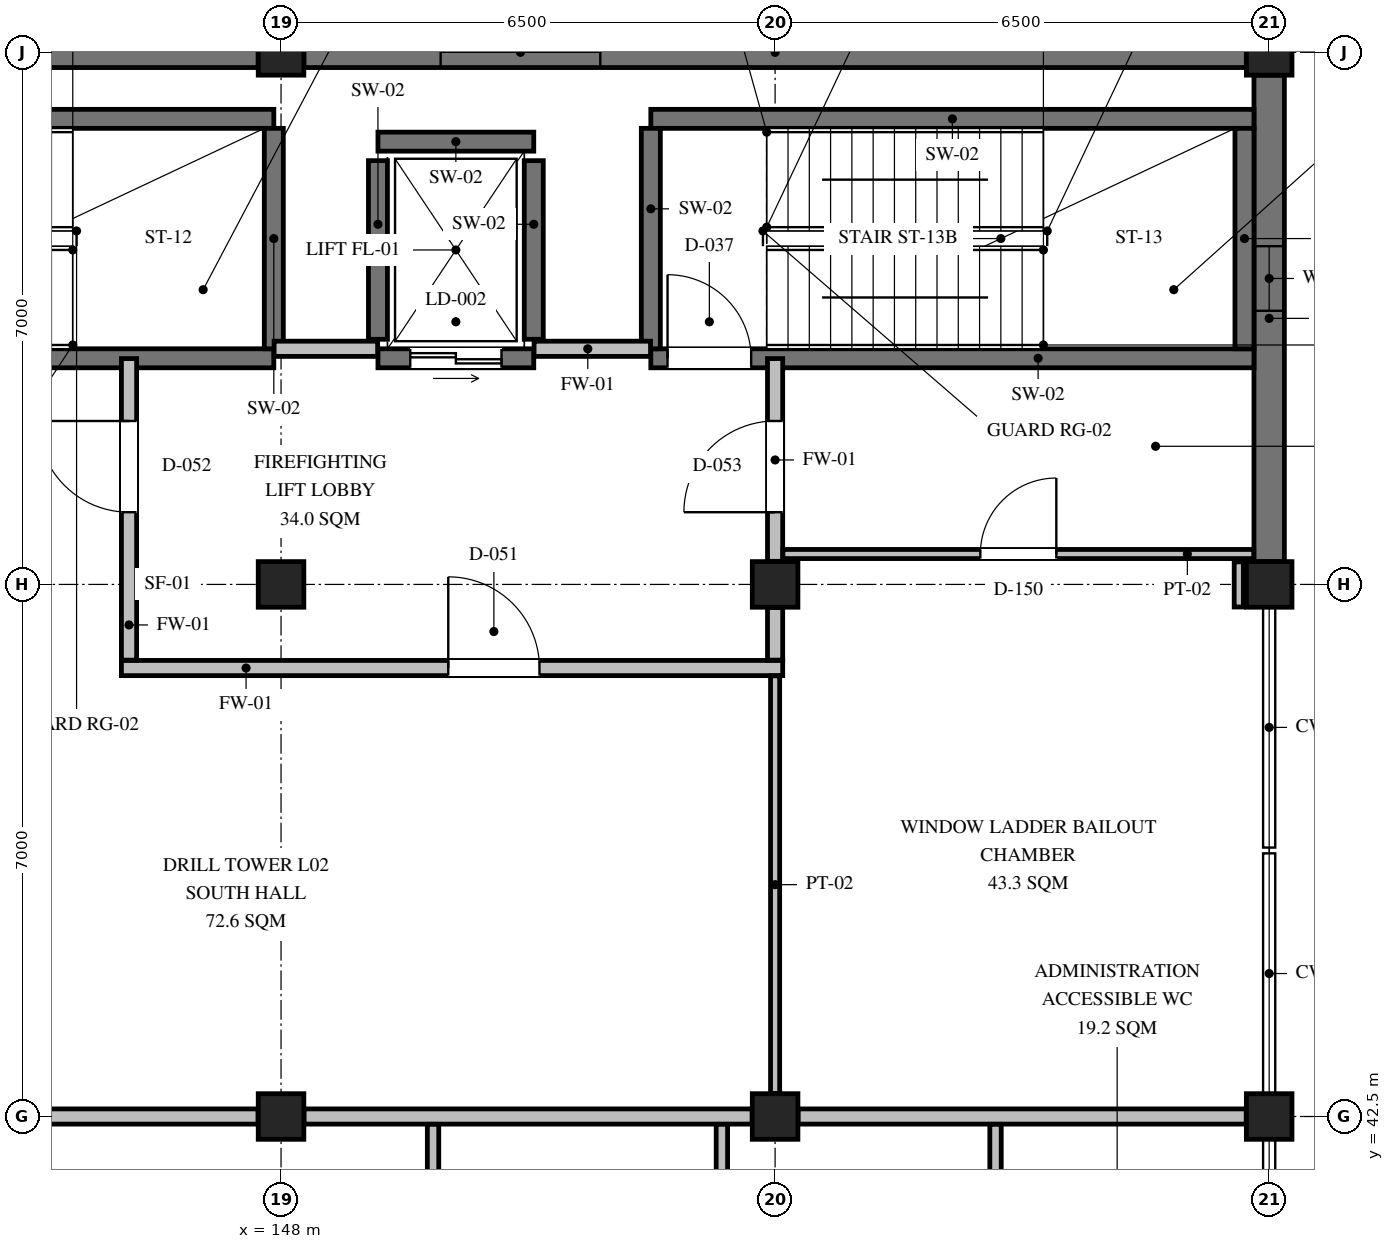
"""IFC4 building model, lengths in metres.
Left out: names, types, materials, properties, quantities, classifications, styles, units other than length and angle.
Written with IfcOpenShell. Run it as: python <this file> out.ifc"""

import sys

from ifc_helpers import new_model, si_unit, direction, frame, frame_2d, origin, origin_2d, place, context, subcontext, project, spatial, rectangle, extrude, element, fill, save


model = new_model("IFC4")
c1 = context("Model", 3, precision=1e-05, world=origin(), true_north=direction((0.0, 1.0)))
c2 = subcontext(c1, "Body", "Model", "MODEL_VIEW")
j1 = project(units=[si_unit("LENGTHUNIT", "METRE"), si_unit("PLANEANGLEUNIT", "RADIAN")], contexts=[c1])
p1 = place(None, origin())
s1 = spatial("IfcSite", under=j1, at=p1, CompositionType="ELEMENT")
p2 = place(p1, origin())
s2 = spatial("IfcBuilding", under=s1, at=p2, CompositionType="ELEMENT")
p3 = place(p2, frame((0.0, 0.0, 5.85)))
s3 = spatial("IfcBuildingStorey", under=s2, at=p3, CompositionType="ELEMENT", Elevation=5.85)
for number, where, z_axis, x_axis in (
    (1, (148.0, 42.5, 0.0), (0.0, 0.0, 1.0), (1.0, 0.0, 0.0)),
    (2, (148.0, 49.5, 0.0), (0.0, 0.0, 1.0), (1.0, 0.0, 0.0)),
    (3, (148.0, 56.5, 0.0), (0.0, 0.0, 1.0), (1.0, 0.0, 0.0)),
    (4, (154.5, 42.5, 0.0), (0.0, 0.0, 1.0), (1.0, 0.0, 0.0)),
    (5, (154.5, 49.5, 0.0), (0.0, 0.0, 1.0), (1.0, 0.0, 0.0)),
    (6, (161.0, 42.5, 0.0), (0.0, 0.0, 1.0), (1.0, 0.0, 0.0)),
    (7, (161.0, 49.5, 0.0), (0.0, 0.0, 1.0), (1.0, 0.0, 0.0)),
    (8, (161.0, 56.5, 0.0), (0.0, 0.0, 1.0), (1.0, 0.0, 0.0)),
):
    element("IfcColumn", number, at=place(p3, frame(where, z_axis=z_axis, x_axis=x_axis)), inside=s3, PredefinedType="COLUMN", context=c2, shape_type="SweptSolid", body=[
        extrude(rectangle(XDim=0.6, YDim=0.6, at=origin_2d()), origin(), (0.0, 0.0, 1.0), 4.2),
    ])
p4 = place(p3, frame((140.3, 56.5, 0.0), z_axis=(0.0, 0.0, 1.0), x_axis=(1.0, 0.0, 0.0)))
e9 = element("IfcWall", 9, at=p4, inside=s3, PredefinedType="SHEAR", context=c2, shape_type="SweptSolid", body=[
    extrude(rectangle(XDim=7.4, YDim=0.4, at=frame_2d((3.7, 0.0))), origin(), (0.0, 0.0, 1.0), 4.0),
])
p5 = place(p4, frame((1.8, 0.0, 0.9)))
e10 = element("IfcOpeningElement", 10, at=p5, cuts=e9, PredefinedType="OPENING", context=c2, shape_type="SweptSolid", body=[
    extrude(rectangle(XDim=1.8, YDim=2.1, at=frame_2d((0.9, 1.05))), frame((0.0, 0.21, 0.0), z_axis=(0.0, -1.0, 0.0), x_axis=(1.0, 0.0, 0.0)), (0.0, 0.0, 1.0), 0.42),
])
p6 = place(p3, frame((148.3, 56.5, 0.0), z_axis=(0.0, 0.0, 1.0), x_axis=(1.0, 0.0, 0.0)))
e11 = element("IfcWall", 11, at=p6, inside=s3, PredefinedType="SHEAR", context=c2, shape_type="SweptSolid", body=[
    extrude(rectangle(XDim=12.4, YDim=0.4, at=frame_2d((6.2, 0.0))), origin(), (0.0, 0.0, 1.0), 4.0),
])
p7 = place(p6, frame((1.8, 0.0, 0.9)))
e12 = element("IfcOpeningElement", 12, at=p7, cuts=e11, PredefinedType="OPENING", context=c2, shape_type="SweptSolid", body=[
    extrude(rectangle(XDim=2.1, YDim=2.1, at=frame_2d((1.05, 1.05))), frame((0.0, 0.21, 0.0), z_axis=(0.0, -1.0, 0.0), x_axis=(1.0, 0.0, 0.0)), (0.0, 0.0, 1.0), 0.42),
])
p8 = place(p3, frame((161.0, 49.8, 0.0), z_axis=(0.0, 0.0, 1.0), x_axis=(0.0, 1.0, 0.0)))
e13 = element("IfcWall", 13, at=p8, inside=s3, PredefinedType="SHEAR", context=c2, shape_type="SweptSolid", body=[
    extrude(rectangle(XDim=6.4, YDim=0.4, at=frame_2d((3.2, 0.0))), origin(), (0.0, 0.0, 1.0), 4.0),
])
p9 = place(p8, frame((3.3, 0.0, 1.1)))
e14 = element("IfcOpeningElement", 14, at=p9, cuts=e13, PredefinedType="OPENING", context=c2, shape_type="SweptSolid", body=[
    extrude(rectangle(XDim=0.85, YDim=0.85, at=frame_2d((0.425, 0.425))), frame((0.0, 0.21, 0.0), z_axis=(0.0, -1.0, 0.0), x_axis=(1.0, 0.0, 0.0)), (0.0, 0.0, 1.0), 0.42),
])
p10 = place(p3, frame((140.095, 52.475, 0.0), z_axis=(0.0, 0.0, 1.0), x_axis=(1.0, 0.0, 0.0)))
e15 = element("IfcWall", 15, at=p10, inside=s3, PredefinedType="SHEAR", context=c2, shape_type="SweptSolid", body=[
    extrude(rectangle(XDim=7.81, YDim=0.25, at=frame_2d((3.905, 0.0))), origin(), (0.0, 0.0, 1.0), 4.0),
])
p11 = place(p10, frame((0.22, 0.0, 0.0)))
e16 = element("IfcOpeningElement", 16, at=p11, cuts=e15, PredefinedType="OPENING", context=c2, shape_type="SweptSolid", body=[
    extrude(rectangle(XDim=1.1, YDim=2.15, at=frame_2d((0.55, 1.075))), frame((0.0, 0.135, 0.0), z_axis=(0.0, -1.0, 0.0), x_axis=(1.0, 0.0, 0.0)), (0.0, 0.0, 1.0), 0.27),
])
p12 = place(p3, frame((140.095, 55.625, 0.0), z_axis=(0.0, 0.0, 1.0), x_axis=(1.0, 0.0, 0.0)))
e17 = element("IfcWall", 17, at=p12, inside=s3, PredefinedType="SHEAR", context=c2, shape_type="SweptSolid", body=[
    extrude(rectangle(XDim=7.81, YDim=0.25, at=frame_2d((3.905, 0.0))), origin(), (0.0, 0.0, 1.0), 4.0),
])
p13 = place(p3, frame((147.905, 52.6, 0.0), z_axis=(0.0, 0.0, 1.0), x_axis=(0.0, 1.0, 0.0)))
e18 = element("IfcWall", 18, at=p13, inside=s3, PredefinedType="SHEAR", context=c2, shape_type="SweptSolid", body=[
    extrude(rectangle(XDim=2.9, YDim=0.25, at=frame_2d((1.45, 0.0))), origin(), (0.0, 0.0, 1.0), 4.0),
])
p14 = place(p3, frame((152.865, 52.475, 0.0), z_axis=(0.0, 0.0, 1.0), x_axis=(1.0, 0.0, 0.0)))
e19 = element("IfcWall", 19, at=p14, inside=s3, PredefinedType="SHEAR", context=c2, shape_type="SweptSolid", body=[
    extrude(rectangle(XDim=7.935, YDim=0.25, at=frame_2d((3.968, 0.0))), origin(), (0.0, 0.0, 1.0), 4.0),
])
p15 = place(p14, frame((0.22, 0.0, 0.0)))
e20 = element("IfcOpeningElement", 20, at=p15, cuts=e19, PredefinedType="OPENING", context=c2, shape_type="SweptSolid", body=[
    extrude(rectangle(XDim=1.1, YDim=2.15, at=frame_2d((0.55, 1.075))), frame((0.0, 0.135, 0.0), z_axis=(0.0, -1.0, 0.0), x_axis=(1.0, 0.0, 0.0)), (0.0, 0.0, 1.0), 0.27),
])
p16 = place(p3, frame((152.865, 55.625, 0.0), z_axis=(0.0, 0.0, 1.0), x_axis=(1.0, 0.0, 0.0)))
e21 = element("IfcWall", 21, at=p16, inside=s3, PredefinedType="SHEAR", context=c2, shape_type="SweptSolid", body=[
    extrude(rectangle(XDim=7.935, YDim=0.25, at=frame_2d((3.968, 0.0))), origin(), (0.0, 0.0, 1.0), 4.0),
])
for number, where, z_axis, x_axis in (
    (22, (152.865, 52.6, 0.0), (0.0, 0.0, 1.0), (0.0, 1.0, 0.0)),
    (23, (160.675, 52.6, 0.0), (0.0, 0.0, 1.0), (0.0, 1.0, 0.0)),
):
    element("IfcWall", number, at=place(p3, frame(where, z_axis=z_axis, x_axis=x_axis)), inside=s3, PredefinedType="SHEAR", context=c2, shape_type="SweptSolid", body=[
        extrude(rectangle(XDim=2.9, YDim=0.25, at=frame_2d((1.45, 0.0))), origin(), (0.0, 0.0, 1.0), 4.0),
    ])
p17 = place(p3, frame((149.275, 52.475, 0.0), z_axis=(0.0, 0.0, 1.0), x_axis=(1.0, 0.0, 0.0)))
e24 = element("IfcWall", 24, at=p17, inside=s3, PredefinedType="SHEAR", context=c2, shape_type="SweptSolid", body=[
    extrude(rectangle(XDim=2.05, YDim=0.25, at=frame_2d((1.025, 0.0))), origin(), (0.0, 0.0, 1.0), 4.0),
])
p18 = place(p17, frame((0.425, 0.0, 0.0)))
e25 = element("IfcOpeningElement", 25, at=p18, cuts=e24, PredefinedType="OPENING", context=c2, shape_type="SweptSolid", body=[
    extrude(rectangle(XDim=1.2, YDim=2.15, at=frame_2d((0.6, 1.075))), frame((0.0, 0.135, 0.0), z_axis=(0.0, -1.0, 0.0), x_axis=(1.0, 0.0, 0.0)), (0.0, 0.0, 1.0), 0.27),
])
p19 = place(p3, frame((149.275, 55.325, 0.0), z_axis=(0.0, 0.0, 1.0), x_axis=(1.0, 0.0, 0.0)))
e26 = element("IfcWall", 26, at=p19, inside=s3, PredefinedType="SHEAR", context=c2, shape_type="SweptSolid", body=[
    extrude(rectangle(XDim=2.05, YDim=0.25, at=frame_2d((1.025, 0.0))), origin(), (0.0, 0.0, 1.0), 4.0),
])
for number, where, z_axis, x_axis in (
    (27, (149.275, 52.725, 0.0), (0.0, 0.0, 1.0), (0.0, 1.0, 0.0)),
    (28, (151.325, 52.725, 0.0), (0.0, 0.0, 1.0), (0.0, 1.0, 0.0)),
):
    element("IfcWall", number, at=place(p3, frame(where, z_axis=z_axis, x_axis=x_axis)), inside=s3, PredefinedType="SHEAR", context=c2, shape_type="SweptSolid", body=[
        extrude(rectangle(XDim=2.35, YDim=0.25, at=frame_2d((1.175, 0.0))), origin(), (0.0, 0.0, 1.0), 4.0),
    ])
p20 = place(p3, frame((140.302, 42.5, 0.0), z_axis=(0.0, 0.0, 1.0), x_axis=(1.0, 0.0, 0.0)))
e29 = element("IfcWall", 29, at=p20, inside=s3, PredefinedType="PARTITIONING", context=c2, shape_type="SweptSolid", body=[
    extrude(rectangle(XDim=7.396, YDim=0.2, at=frame_2d((3.698, 0.0))), origin(), (0.0, 0.0, 1.0), 3.154),
])
p21 = place(p20, frame((3.298, 0.0, 0.0)))
e30 = element("IfcOpeningElement", 30, at=p21, cuts=e29, PredefinedType="OPENING", context=c2, shape_type="SweptSolid", body=[
    extrude(rectangle(XDim=1.2, YDim=2.15, at=frame_2d((0.6, 1.075))), frame((0.0, 0.11, 0.0), z_axis=(0.0, -1.0, 0.0), x_axis=(1.0, 0.0, 0.0)), (0.0, 0.0, 1.0), 0.22),
])
p22 = place(p3, frame((148.302, 42.5, 0.0), z_axis=(0.0, 0.0, 1.0), x_axis=(1.0, 0.0, 0.0)))
e31 = element("IfcWall", 31, at=p22, inside=s3, PredefinedType="PARTITIONING", context=c2, shape_type="SweptSolid", body=[
    extrude(rectangle(XDim=5.896, YDim=0.2, at=frame_2d((2.948, 0.0))), origin(), (0.0, 0.0, 1.0), 3.054),
])
p23 = place(p3, frame((154.802, 42.5, 0.0), z_axis=(0.0, 0.0, 1.0), x_axis=(1.0, 0.0, 0.0)))
e32 = element("IfcWall", 32, at=p23, inside=s3, PredefinedType="PARTITIONING", context=c2, shape_type="SweptSolid", body=[
    extrude(rectangle(XDim=5.896, YDim=0.2, at=frame_2d((2.948, 0.0))), origin(), (0.0, 0.0, 1.0), 2.854),
])
p24 = place(p3, frame((147.909, 52.6, 0.0), z_axis=(0.0, 0.0, 1.0), x_axis=(1.0, 0.0, 0.0)))
e33 = element("IfcWall", 33, at=p24, inside=s3, PredefinedType="PARTITIONING", context=c2, shape_type="SweptSolid", body=[
    extrude(rectangle(XDim=1.362, YDim=0.2, at=frame_2d((0.681, 0.0))), origin(), (0.0, 0.0, 1.0), 4.0),
])
p25 = place(p3, frame((151.329, 52.6, 0.0), z_axis=(0.0, 0.0, 1.0), x_axis=(1.0, 0.0, 0.0)))
e34 = element("IfcWall", 34, at=p25, inside=s3, PredefinedType="PARTITIONING", context=c2, shape_type="SweptSolid", body=[
    extrude(rectangle(XDim=1.532, YDim=0.2, at=frame_2d((0.766, 0.0))), origin(), (0.0, 0.0, 1.0), 4.0),
])
p26 = place(p3, frame((145.9, 48.4, 0.0), z_axis=(0.0, 0.0, 1.0), x_axis=(1.0, 0.0, 0.0)))
e35 = element("IfcWall", 35, at=p26, inside=s3, PredefinedType="PARTITIONING", context=c2, shape_type="SweptSolid", body=[
    extrude(rectangle(XDim=8.7, YDim=0.2, at=frame_2d((4.35, 0.0))), origin(), (0.0, 0.0, 1.0), 4.0),
])
p27 = place(p26, frame((4.3, 0.0, 0.0)))
e36 = element("IfcOpeningElement", 36, at=p27, cuts=e35, PredefinedType="OPENING", context=c2, shape_type="SweptSolid", body=[
    extrude(rectangle(XDim=1.2, YDim=2.15, at=frame_2d((0.6, 1.075))), frame((0.0, 0.11, 0.0), z_axis=(0.0, -1.0, 0.0), x_axis=(1.0, 0.0, 0.0)), (0.0, 0.0, 1.0), 0.22),
])
p28 = place(p3, frame((146.0, 48.504, 0.0), z_axis=(0.0, 0.0, 1.0), x_axis=(0.0, 1.0, 0.0)))
e37 = element("IfcWall", 37, at=p28, inside=s3, PredefinedType="PARTITIONING", context=c2, shape_type="SweptSolid", body=[
    extrude(rectangle(XDim=3.967, YDim=0.2, at=frame_2d((1.983, 0.0))), origin(), (0.0, 0.0, 1.0), 4.0),
])
p29 = place(p28, frame((1.946, 0.0, 0.0)))
e38 = element("IfcOpeningElement", 38, at=p29, cuts=e37, PredefinedType="OPENING", context=c2, shape_type="SweptSolid", body=[
    extrude(rectangle(XDim=1.2, YDim=2.15, at=frame_2d((0.6, 1.075))), frame((0.0, 0.11, 0.0), z_axis=(0.0, -1.0, 0.0), x_axis=(1.0, 0.0, 0.0)), (0.0, 0.0, 1.0), 0.22),
])
p30 = place(p3, frame((154.5, 48.504, 0.0), z_axis=(0.0, 0.0, 1.0), x_axis=(0.0, 1.0, 0.0)))
e39 = element("IfcWall", 39, at=p30, inside=s3, PredefinedType="PARTITIONING", context=c2, shape_type="SweptSolid", body=[
    extrude(rectangle(XDim=0.692, YDim=0.2, at=frame_2d((0.346, 0.0))), origin(), (0.0, 0.0, 1.0), 3.564),
])
p31 = place(p3, frame((154.5, 49.804, 0.0), z_axis=(0.0, 0.0, 1.0), x_axis=(0.0, 1.0, 0.0)))
e40 = element("IfcWall", 40, at=p31, inside=s3, PredefinedType="PARTITIONING", context=c2, shape_type="SweptSolid", body=[
    extrude(rectangle(XDim=2.667, YDim=0.2, at=frame_2d((1.333, 0.0))), origin(), (0.0, 0.0, 1.0), 4.0),
])
p32 = place(p31, frame((0.646, 0.0, 0.0)))
e41 = element("IfcOpeningElement", 41, at=p32, cuts=e40, PredefinedType="OPENING", context=c2, shape_type="SweptSolid", body=[
    extrude(rectangle(XDim=1.2, YDim=2.15, at=frame_2d((0.6, 1.075))), frame((0.0, 0.11, 0.0), z_axis=(0.0, -1.0, 0.0), x_axis=(1.0, 0.0, 0.0)), (0.0, 0.0, 1.0), 0.22),
])
p33 = place(p3, frame((150.0, 36.278, 0.0), z_axis=(0.0, 0.0, 1.0), x_axis=(0.0, 1.0, 0.0)))
e42 = element("IfcWall", 42, at=p33, inside=s3, PredefinedType="PARTITIONING", context=c2, shape_type="SweptSolid", body=[
    extrude(rectangle(XDim=6.119, YDim=0.15, at=frame_2d((3.06, 0.0))), origin(), (0.0, 0.0, 1.0), 3.71),
])
for number, where, z_axis, x_axis in (
    (43, (153.8, 36.278, 0.0), (0.0, 0.0, 1.0), (0.0, 1.0, 0.0)),
    (44, (157.4, 36.278, 0.0), (0.0, 0.0, 1.0), (0.0, 1.0, 0.0)),
):
    element("IfcWall", number, at=place(p3, frame(where, z_axis=z_axis, x_axis=x_axis)), inside=s3, PredefinedType="PARTITIONING", context=c2, shape_type="SweptSolid", body=[
        extrude(rectangle(XDim=6.119, YDim=0.15, at=frame_2d((3.06, 0.0))), origin(), (0.0, 0.0, 1.0), 3.96),
    ])
p34 = place(p3, frame((154.603, 49.9, 0.0), z_axis=(0.0, 0.0, 1.0), x_axis=(1.0, 0.0, 0.0)))
e45 = element("IfcWall", 45, at=p34, inside=s3, PredefinedType="PARTITIONING", context=c2, shape_type="SweptSolid", body=[
    extrude(rectangle(XDim=6.194, YDim=0.12, at=frame_2d((3.097, 0.0))), origin(), (0.0, 0.0, 1.0), 4.0),
])
p35 = place(p34, frame((2.597, 0.0, 0.0)))
e46 = element("IfcOpeningElement", 46, at=p35, cuts=e45, PredefinedType="OPENING", context=c2, shape_type="SweptSolid", body=[
    extrude(rectangle(XDim=1.0, YDim=2.1, at=frame_2d((0.5, 1.05))), frame((0.0, 0.07, 0.0), z_axis=(0.0, -1.0, 0.0), x_axis=(1.0, 0.0, 0.0)), (0.0, 0.0, 1.0), 0.14),
])
p36 = place(p3, frame((154.5, 42.803, 0.0), z_axis=(0.0, 0.0, 1.0), x_axis=(0.0, 1.0, 0.0)))
e47 = element("IfcWall", 47, at=p36, inside=s3, PredefinedType="PARTITIONING", context=c2, shape_type="SweptSolid", body=[
    extrude(rectangle(XDim=5.494, YDim=0.12, at=frame_2d((2.747, 0.0))), origin(), (0.0, 0.0, 1.0), 3.564),
])
p37 = place(p3, frame((160.6, 49.203, 0.0), z_axis=(0.0, 0.0, 1.0), x_axis=(0.0, 1.0, 0.0)))
e48 = element("IfcWall", 48, at=p37, inside=s3, PredefinedType="PARTITIONING", context=c2, shape_type="SweptSolid", body=[
    extrude(rectangle(XDim=0.594, YDim=0.12, at=frame_2d((0.297, 0.0))), origin(), (0.0, 0.0, 1.0), 4.0),
])
p38 = place(p7, origin())
e49 = element("IfcWindow", 49, at=p38, inside=s3, PartitioningType="SINGLE_PANEL", PredefinedType="WINDOW", context=c2, shape_type="SweptSolid", body=[
    extrude(rectangle(XDim=2.1, YDim=2.1, at=frame_2d((1.05, 1.05))), frame((0.0, 0.03, 0.0), z_axis=(0.0, -1.0, 0.0), x_axis=(1.0, 0.0, 0.0)), (0.0, 0.0, 1.0), 0.06),
])
fill(e12, e49)
p39 = place(p9, origin())
e50 = element("IfcWindow", 50, at=p39, inside=s3, PartitioningType="SINGLE_PANEL", PredefinedType="WINDOW", context=c2, shape_type="SweptSolid", body=[
    extrude(rectangle(XDim=0.85, YDim=0.85, at=frame_2d((0.425, 0.425))), frame((0.0, 0.03, 0.0), z_axis=(0.0, -1.0, 0.0), x_axis=(1.0, 0.0, 0.0)), (0.0, 0.0, 1.0), 0.06),
])
fill(e14, e50)
p40 = place(p15, frame((1.1, 0.0, 0.0), z_axis=(0.0, 0.0, 1.0), x_axis=(-1.0, 0.0, 0.0)))
e51 = element("IfcDoor", 51, at=p40, inside=s3, OperationType="SINGLE_SWING_LEFT", PredefinedType="DOOR", context=c2, shape_type="SweptSolid", body=[
    extrude(rectangle(XDim=1.1, YDim=2.15, at=frame_2d((0.55, 1.075))), frame((0.0, 0.025, 0.0), z_axis=(0.0, -1.0, 0.0), x_axis=(1.0, 0.0, 0.0)), (0.0, 0.0, 1.0), 0.05),
])
fill(e20, e51)
p41 = place(p18, origin())
e52 = element("IfcDoor", 52, at=p41, inside=s3, OperationType="DOUBLE_DOOR_SLIDING", PredefinedType="DOOR", context=c2, shape_type="SweptSolid", body=[
    extrude(rectangle(XDim=1.2, YDim=2.15, at=frame_2d((0.6, 1.075))), frame((0.0, 0.025, 0.0), z_axis=(0.0, -1.0, 0.0), x_axis=(1.0, 0.0, 0.0)), (0.0, 0.0, 1.0), 0.05),
])
fill(e25, e52)
p42 = place(p27, origin())
e53 = element("IfcDoor", 53, at=p42, inside=s3, OperationType="SINGLE_SWING_LEFT", PredefinedType="DOOR", context=c2, shape_type="SweptSolid", body=[
    extrude(rectangle(XDim=1.2, YDim=2.15, at=frame_2d((0.6, 1.075))), frame((0.0, 0.025, 0.0), z_axis=(0.0, -1.0, 0.0), x_axis=(1.0, 0.0, 0.0)), (0.0, 0.0, 1.0), 0.05),
])
fill(e36, e53)
p43 = place(p29, origin())
e54 = element("IfcDoor", 54, at=p43, inside=s3, OperationType="SINGLE_SWING_RIGHT", PredefinedType="DOOR", context=c2, shape_type="SweptSolid", body=[
    extrude(rectangle(XDim=1.2, YDim=2.15, at=frame_2d((0.6, 1.075))), frame((0.0, 0.025, 0.0), z_axis=(0.0, -1.0, 0.0), x_axis=(1.0, 0.0, 0.0)), (0.0, 0.0, 1.0), 0.05),
])
fill(e38, e54)
p44 = place(p32, origin())
e55 = element("IfcDoor", 55, at=p44, inside=s3, OperationType="SINGLE_SWING_LEFT", PredefinedType="DOOR", context=c2, shape_type="SweptSolid", body=[
    extrude(rectangle(XDim=1.2, YDim=2.15, at=frame_2d((0.6, 1.075))), frame((0.0, 0.025, 0.0), z_axis=(0.0, -1.0, 0.0), x_axis=(1.0, 0.0, 0.0)), (0.0, 0.0, 1.0), 0.05),
])
fill(e41, e55)
p45 = place(p35, origin())
e56 = element("IfcDoor", 56, at=p45, inside=s3, OperationType="SINGLE_SWING_RIGHT", PredefinedType="DOOR", context=c2, shape_type="SweptSolid", body=[
    extrude(rectangle(XDim=1.0, YDim=2.1, at=frame_2d((0.5, 1.05))), frame((0.0, 0.025, 0.0), z_axis=(0.0, -1.0, 0.0), x_axis=(1.0, 0.0, 0.0)), (0.0, 0.0, 1.0), 0.05),
])
fill(e46, e56)
save(model, sys.argv[1])
